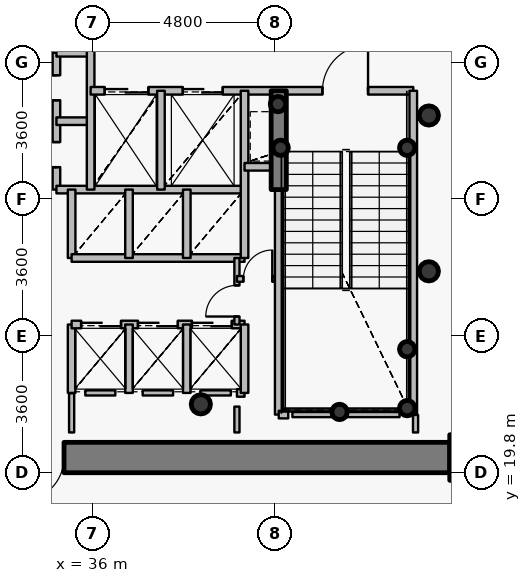
"""IFC4 building model, lengths in metres.
Left out: names, types, materials, properties, quantities, classifications, styles, units other than length and angle.
Written with IfcOpenShell. Run it as: python <this file> out.ifc"""

import sys

from ifc_helpers import new_model, si_unit, direction, frame, frame_2d, origin, origin_2d, place, context, subcontext, project, spatial, rectangle, hollow_circle, extrude, source, transform, mapped, element, fill, save


model = new_model("IFC4")
c1 = context("Model", 3, precision=1e-05, world=origin(), true_north=direction((0.0, 1.0)))
c2 = subcontext(c1, "Body", "Model", "MODEL_VIEW")
j1 = project(units=[si_unit("LENGTHUNIT", "METRE"), si_unit("PLANEANGLEUNIT", "RADIAN")], contexts=[c1])
p1 = place(None, origin())
s1 = spatial("IfcSite", under=j1, at=p1, CompositionType="ELEMENT")
p2 = place(p1, origin())
s2 = spatial("IfcBuilding", under=s1, at=p2, CompositionType="ELEMENT")
p3 = place(p2, frame((0.0, 0.0, 130.95)))
s3 = spatial("IfcBuildingStorey", under=s2, at=p3, CompositionType="ELEMENT", Elevation=130.95)
p4 = place(p3, frame((46.0, 20.2, 0.0), z_axis=(0.0, 0.0, 1.0), x_axis=(1.0, 0.0, 0.0)))
e1 = element("IfcColumn", 1, at=p4, inside=s3, PredefinedType="COLUMN", context=c2, shape_type="SweptSolid", body=[
    extrude(rectangle(XDim=1.2, YDim=1.2, at=origin_2d()), origin(), (0.0, 0.0, 1.0), 3.75),
])
p5 = place(p3, frame((38.85, 21.6, 0.0), z_axis=(0.0, 0.0, 1.0), x_axis=(1.0, 0.0, 0.0)))
e2 = element("IfcColumn", 2, at=p5, inside=s3, PredefinedType="COLUMN", context=c2, shape_type="SweptSolid", body=[
    extrude(hollow_circle(Radius=0.254, WallThickness=0.02, at=origin_2d()), origin(), (0.0, 0.0, 1.0), 3.75),
])
for number, where, z_axis, x_axis in (
    (3, (44.28, 21.5, 0.0), (0.0, 0.0, 1.0), (1.0, 0.0, 0.0)),
    (4, (44.28, 23.05, 0.0), (0.0, 0.0, 1.0), (1.0, 0.0, 0.0)),
    (5, (42.5, 21.4, 0.0), (0.0, 0.0, 1.0), (1.0, 0.0, 0.0)),
    (6, (40.95, 28.35, 0.0), (0.0, 0.0, 1.0), (1.0, 0.0, 0.0)),
    (7, (44.28, 28.35, 0.0), (0.0, 0.0, 1.0), (1.0, 0.0, 0.0)),
    (8, (40.88, 29.5, 0.0), (0.0, 0.0, 1.0), (1.0, 0.0, 0.0)),
):
    element("IfcColumn", number, at=place(p3, frame(where, z_axis=z_axis, x_axis=x_axis)), inside=s3, PredefinedType="COLUMN", context=c2, shape_type="SweptSolid", body=[
        extrude(hollow_circle(Radius=0.203, WallThickness=0.016, at=origin_2d()), origin(), (0.0, 0.0, 1.0), 3.75),
    ])
p6 = place(p3, frame((45.4, 20.2, 0.0), z_axis=(0.0, 0.0, 1.0), x_axis=(-1.0, 0.0, 0.0)))
e9 = element("IfcWall", 9, at=p6, inside=s3, PredefinedType="SHEAR", context=c2, shape_type="SweptSolid", body=[
    extrude(rectangle(XDim=18.8, YDim=0.8, at=frame_2d((9.4, 0.0))), origin(), (0.0, 0.0, 1.0), 2.95),
])
p7 = place(p6, frame((10.15, 0.0, 0.0)))
e10 = element("IfcOpeningElement", 10, at=p7, cuts=e9, PredefinedType="OPENING", context=c2, shape_type="SweptSolid", body=[
    extrude(rectangle(XDim=1.15, YDim=2.15, at=origin_2d()), frame((0.575, 0.41, 1.075), z_axis=(0.0, -1.0, 0.0), x_axis=(1.0, 0.0, 0.0)), (0.0, 0.0, 1.0), 0.82),
])
p8 = place(p3, frame((40.9, 27.25, 0.0), z_axis=(0.0, 0.0, 1.0), x_axis=(0.0, 1.0, 0.0)))
e11 = element("IfcWall", 11, at=p8, inside=s3, PredefinedType="SHEAR", context=c2, shape_type="SweptSolid", body=[
    extrude(rectangle(XDim=2.6, YDim=0.4, at=frame_2d((1.3, 0.0))), origin(), (0.0, 0.0, 1.0), 3.1),
])
for number, where, z_axis, x_axis in (
    (12, (44.85, 25.1, 0.0), (0.0, 0.0, 1.0), (1.0, 0.0, 0.0)),
    (13, (44.85, 29.2, 0.0), (0.0, 0.0, 1.0), (1.0, 0.0, 0.0)),
):
    element("IfcColumn", number, at=place(p3, frame(where, z_axis=z_axis, x_axis=x_axis)), inside=s3, PredefinedType="COLUMN", context=c2, shape_type="SweptSolid", body=[
        extrude(hollow_circle(Radius=0.254, WallThickness=0.02, at=origin_2d()), origin(), (0.0, 0.0, 1.0), 3.75),
    ])
p9 = place(p3, frame((35.05, 27.25, 0.0), z_axis=(0.0, 0.0, 1.0), x_axis=(0.0, 1.0, 0.0)))
e14 = element("IfcWall", 14, at=p9, inside=s3, PredefinedType="PARTITIONING", context=c2, shape_type="SweptSolid", body=[
    extrude(rectangle(XDim=3.6, YDim=0.2, at=frame_2d((1.8, 0.0))), origin(), (0.0, 0.0, 1.0), 3.5),
])
p10 = place(p9, frame((0.59, 0.0, 0.0)))
e15 = element("IfcOpeningElement", 15, at=p10, cuts=e14, PredefinedType="OPENING", context=c2, shape_type="SweptSolid", body=[
    extrude(rectangle(XDim=0.66, YDim=2.05, at=origin_2d()), frame((0.33, 0.11, 1.025), z_axis=(0.0, -1.0, 0.0), x_axis=(1.0, 0.0, 0.0)), (0.0, 0.0, 1.0), 0.22),
])
p11 = place(p9, frame((2.35, 0.0, 0.0)))
e16 = element("IfcOpeningElement", 16, at=p11, cuts=e14, PredefinedType="OPENING", context=c2, shape_type="SweptSolid", body=[
    extrude(rectangle(XDim=0.66, YDim=2.05, at=origin_2d()), frame((0.33, 0.11, 1.025), z_axis=(0.0, -1.0, 0.0), x_axis=(1.0, 0.0, 0.0)), (0.0, 0.0, 1.0), 0.22),
])
p12 = place(p3, frame((35.05, 27.25, 0.0), z_axis=(0.0, 0.0, 1.0), x_axis=(1.0, 0.0, 0.0)))
e17 = element("IfcWall", 17, at=p12, inside=s3, PredefinedType="PARTITIONING", context=c2, shape_type="SweptSolid", body=[
    extrude(rectangle(XDim=4.95, YDim=0.2, at=frame_2d((2.475, 0.0))), origin(), (0.0, 0.0, 1.0), 3.085),
])
for number, where, z_axis, x_axis in (
    (18, (35.05, 29.05, 0.0), (0.0, 0.0, 1.0), (1.0, 0.0, 0.0)),
    (19, (35.05, 30.85, 0.0), (0.0, 0.0, 1.0), (1.0, 0.0, 0.0)),
):
    element("IfcWall", number, at=place(p3, frame(where, z_axis=z_axis, x_axis=x_axis)), inside=s3, PredefinedType="PARTITIONING", context=c2, shape_type="SweptSolid", body=[
        extrude(rectangle(XDim=0.9, YDim=0.2, at=frame_2d((0.45, 0.0))), origin(), (0.0, 0.0, 1.0), 3.5),
    ])
p13 = place(p3, frame((35.45, 21.9, 0.0), z_axis=(0.0, 0.0, 1.0), x_axis=(0.0, 1.0, 0.0)))
e20 = element("IfcWall", 20, at=p13, inside=s3, PredefinedType="PARTITIONING", context=c2, shape_type="SweptSolid", body=[
    extrude(rectangle(XDim=1.8, YDim=0.2, at=frame_2d((0.9, 0.0))), origin(), (0.0, 0.0, 1.0), 3.5),
])
p14 = place(p3, frame((35.45, 23.7, 0.0), z_axis=(0.0, 0.0, 1.0), x_axis=(1.0, 0.0, 0.0)))
e21 = element("IfcWall", 21, at=p14, inside=s3, PredefinedType="PARTITIONING", context=c2, shape_type="SweptSolid", body=[
    extrude(rectangle(XDim=4.55, YDim=0.2, at=frame_2d((2.275, 0.0))), origin(), (0.0, 0.0, 1.0), 3.085),
])
p15 = place(p14, frame((0.25, 0.0, 0.0)))
e22 = element("IfcOpeningElement", 22, at=p15, cuts=e21, PredefinedType="OPENING", context=c2, shape_type="SweptSolid", body=[
    extrude(rectangle(XDim=1.05, YDim=2.15, at=origin_2d()), frame((0.525, 0.11, 1.075), z_axis=(0.0, -1.0, 0.0), x_axis=(1.0, 0.0, 0.0)), (0.0, 0.0, 1.0), 0.22),
])
p16 = place(p14, frame((1.745, 0.0, 0.0)))
e23 = element("IfcOpeningElement", 23, at=p16, cuts=e21, PredefinedType="OPENING", context=c2, shape_type="SweptSolid", body=[
    extrude(rectangle(XDim=1.05, YDim=2.15, at=origin_2d()), frame((0.525, 0.11, 1.075), z_axis=(0.0, -1.0, 0.0), x_axis=(1.0, 0.0, 0.0)), (0.0, 0.0, 1.0), 0.22),
])
p17 = place(p14, frame((3.165, 0.0, 0.0)))
e24 = element("IfcOpeningElement", 24, at=p17, cuts=e21, PredefinedType="OPENING", context=c2, shape_type="SweptSolid", body=[
    extrude(rectangle(XDim=1.05, YDim=2.15, at=origin_2d()), frame((0.525, 0.11, 1.075), z_axis=(0.0, -1.0, 0.0), x_axis=(1.0, 0.0, 0.0)), (0.0, 0.0, 1.0), 0.22),
])
p18 = place(p3, frame((35.45, 25.45, 0.0), z_axis=(0.0, 0.0, 1.0), x_axis=(0.0, 1.0, 0.0)))
e25 = element("IfcWall", 25, at=p18, inside=s3, PredefinedType="PARTITIONING", context=c2, shape_type="SweptSolid", body=[
    extrude(rectangle(XDim=1.8, YDim=0.2, at=frame_2d((0.9, 0.0))), origin(), (0.0, 0.0, 1.0), 3.5),
])
p19 = place(p3, frame((35.45, 25.45, 0.0), z_axis=(0.0, 0.0, 1.0), x_axis=(1.0, 0.0, 0.0)))
e26 = element("IfcWall", 26, at=p19, inside=s3, PredefinedType="PARTITIONING", context=c2, shape_type="SweptSolid", body=[
    extrude(rectangle(XDim=4.55, YDim=0.2, at=frame_2d((2.275, 0.0))), origin(), (0.0, 0.0, 1.0), 3.085),
])
p20 = place(p3, frame((35.95, 27.25, 0.0), z_axis=(0.0, 0.0, 1.0), x_axis=(0.0, 1.0, 0.0)))
e27 = element("IfcWall", 27, at=p20, inside=s3, PredefinedType="PARTITIONING", context=c2, shape_type="SweptSolid", body=[
    extrude(rectangle(XDim=3.8, YDim=0.2, at=frame_2d((1.9, 0.0))), origin(), (0.0, 0.0, 1.0), 3.5),
])
p21 = place(p3, frame((35.95, 29.85, 0.0), z_axis=(0.0, 0.0, 1.0), x_axis=(1.0, 0.0, 0.0)))
e28 = element("IfcWall", 28, at=p21, inside=s3, PredefinedType="PARTITIONING", context=c2, shape_type="SweptSolid", body=[
    extrude(rectangle(XDim=8.49, YDim=0.2, at=frame_2d((4.245, 0.0))), origin(), (0.0, 0.0, 1.0), 3.085),
])
p22 = place(p21, frame((6.1, 0.0, 0.0)))
e29 = element("IfcOpeningElement", 29, at=p22, cuts=e28, PredefinedType="OPENING", context=c2, shape_type="SweptSolid", body=[
    extrude(rectangle(XDim=1.2, YDim=2.15, at=origin_2d()), frame((0.6, 0.11, 1.075), z_axis=(0.0, -1.0, 0.0), x_axis=(1.0, 0.0, 0.0)), (0.0, 0.0, 1.0), 0.22),
])
p23 = place(p21, frame((0.37, 0.0, 0.0)))
e30 = element("IfcOpeningElement", 30, at=p23, cuts=e28, PredefinedType="OPENING", context=c2, shape_type="SweptSolid", body=[
    extrude(rectangle(XDim=1.15, YDim=2.15, at=origin_2d()), frame((0.575, 0.11, 1.075), z_axis=(0.0, -1.0, 0.0), x_axis=(1.0, 0.0, 0.0)), (0.0, 0.0, 1.0), 0.22),
])
p24 = place(p21, frame((2.425, 0.0, 0.0)))
e31 = element("IfcOpeningElement", 31, at=p24, cuts=e28, PredefinedType="OPENING", context=c2, shape_type="SweptSolid", body=[
    extrude(rectangle(XDim=1.05, YDim=2.15, at=origin_2d()), frame((0.525, 0.11, 1.075), z_axis=(0.0, -1.0, 0.0), x_axis=(1.0, 0.0, 0.0)), (0.0, 0.0, 1.0), 0.22),
])
for number, where, z_axis, x_axis in (
    (32, (36.96, 21.9, 0.0), (0.0, 0.0, 1.0), (0.0, 1.0, 0.0)),
    (33, (36.96, 25.45, 0.0), (0.0, 0.0, 1.0), (0.0, 1.0, 0.0)),
):
    element("IfcWall", number, at=place(p3, frame(where, z_axis=z_axis, x_axis=x_axis)), inside=s3, PredefinedType="PARTITIONING", context=c2, shape_type="SweptSolid", body=[
        extrude(rectangle(XDim=1.8, YDim=0.2, at=frame_2d((0.9, 0.0))), origin(), (0.0, 0.0, 1.0), 3.5),
    ])
p25 = place(p3, frame((37.8, 27.25, 0.0), z_axis=(0.0, 0.0, 1.0), x_axis=(0.0, 1.0, 0.0)))
e34 = element("IfcWall", 34, at=p25, inside=s3, PredefinedType="PARTITIONING", context=c2, shape_type="SweptSolid", body=[
    extrude(rectangle(XDim=2.6, YDim=0.2, at=frame_2d((1.3, 0.0))), origin(), (0.0, 0.0, 1.0), 3.5),
])
for number, where, z_axis, x_axis in (
    (35, (38.48, 21.9, 0.0), (0.0, 0.0, 1.0), (0.0, 1.0, 0.0)),
    (36, (38.48, 25.45, 0.0), (0.0, 0.0, 1.0), (0.0, 1.0, 0.0)),
):
    element("IfcWall", number, at=place(p3, frame(where, z_axis=z_axis, x_axis=x_axis)), inside=s3, PredefinedType="PARTITIONING", context=c2, shape_type="SweptSolid", body=[
        extrude(rectangle(XDim=1.8, YDim=0.2, at=frame_2d((0.9, 0.0))), origin(), (0.0, 0.0, 1.0), 3.5),
    ])
p26 = place(p3, frame((39.8, 21.9, 0.0), z_axis=(0.0, 0.0, 1.0), x_axis=(1.0, 0.0, 0.0)))
e37 = element("IfcWall", 37, at=p26, inside=s3, PredefinedType="PARTITIONING", context=c2, shape_type="SweptSolid", body=[
    extrude(rectangle(XDim=0.2, YDim=0.2, at=frame_2d((0.1, 0.0))), origin(), (0.0, 0.0, 1.0), 3.5),
])
p27 = place(p3, frame((39.8, 23.7, 0.0), z_axis=(0.0, 0.0, 1.0), x_axis=(0.0, 1.0, 0.0)))
e38 = element("IfcWall", 38, at=p27, inside=s3, PredefinedType="PARTITIONING", context=c2, shape_type="SweptSolid", body=[
    extrude(rectangle(XDim=1.75, YDim=0.135, at=frame_2d((0.875, 0.0))), origin(), (0.0, 0.0, 1.0), 3.5),
])
p28 = place(p27, frame((0.21, 0.0, 0.0)))
e39 = element("IfcOpeningElement", 39, at=p28, cuts=e38, PredefinedType="OPENING", context=c2, shape_type="SweptSolid", body=[
    extrude(rectangle(XDim=0.82, YDim=2.1, at=origin_2d()), frame((0.41, 0.078, 1.05), z_axis=(0.0, -1.0, 0.0), x_axis=(1.0, 0.0, 0.0)), (0.0, 0.0, 1.0), 0.155),
])
p29 = place(p3, frame((39.8, 24.9, 0.0), z_axis=(0.0, 0.0, 1.0), x_axis=(1.0, 0.0, 0.0)))
e40 = element("IfcWall", 40, at=p29, inside=s3, PredefinedType="PARTITIONING", context=c2, shape_type="SweptSolid", body=[
    extrude(rectangle(XDim=1.1, YDim=0.15, at=frame_2d((0.55, 0.0))), origin(), (0.0, 0.0, 1.0), 3.5),
])
p30 = place(p29, frame((0.17, 0.0, 0.0)))
e41 = element("IfcOpeningElement", 41, at=p30, cuts=e40, PredefinedType="OPENING", context=c2, shape_type="SweptSolid", body=[
    extrude(rectangle(XDim=0.76, YDim=2.1, at=origin_2d()), frame((0.38, 0.085, 1.05), z_axis=(0.0, -1.0, 0.0), x_axis=(1.0, 0.0, 0.0)), (0.0, 0.0, 1.0), 0.17),
])
p31 = place(p3, frame((40.0, 21.9, 0.0), z_axis=(0.0, 0.0, 1.0), x_axis=(0.0, 1.0, 0.0)))
e42 = element("IfcWall", 42, at=p31, inside=s3, PredefinedType="PARTITIONING", context=c2, shape_type="SweptSolid", body=[
    extrude(rectangle(XDim=1.8, YDim=0.2, at=frame_2d((0.9, 0.0))), origin(), (0.0, 0.0, 1.0), 3.5),
])
p32 = place(p3, frame((40.0, 25.45, 0.0), z_axis=(0.0, 0.0, 1.0), x_axis=(0.0, 1.0, 0.0)))
e43 = element("IfcWall", 43, at=p32, inside=s3, PredefinedType="PARTITIONING", context=c2, shape_type="SweptSolid", body=[
    extrude(rectangle(XDim=4.4, YDim=0.2, at=frame_2d((2.2, 0.0))), origin(), (0.0, 0.0, 1.0), 3.5),
])
p33 = place(p3, frame((40.0, 27.85, 0.0), z_axis=(0.0, 0.0, 1.0), x_axis=(1.0, 0.0, 0.0)))
e44 = element("IfcWall", 44, at=p33, inside=s3, PredefinedType="PARTITIONING", context=c2, shape_type="SweptSolid", body=[
    extrude(rectangle(XDim=0.9, YDim=0.2, at=frame_2d((0.45, 0.0))), origin(), (0.0, 0.0, 1.0), 3.5),
])
p34 = place(p3, frame((40.9, 21.33, 0.0), z_axis=(0.0, 0.0, 1.0), x_axis=(0.0, 1.0, 0.0)))
e45 = element("IfcWall", 45, at=p34, inside=s3, PredefinedType="PARTITIONING", context=c2, shape_type="SweptSolid", body=[
    extrude(rectangle(XDim=5.91, YDim=0.2, at=frame_2d((2.955, 0.0))), origin(), (0.0, 0.0, 1.0), 3.035),
])
p35 = place(p3, frame((40.9, 21.33, 0.0), z_axis=(0.0, 0.0, 1.0), x_axis=(1.0, 0.0, 0.0)))
e46 = element("IfcWall", 46, at=p35, inside=s3, PredefinedType="PARTITIONING", context=c2, shape_type="SweptSolid", body=[
    extrude(rectangle(XDim=0.25, YDim=0.2, at=frame_2d((0.125, 0.0))), origin(), (0.0, 0.0, 1.0), 3.035),
])
p36 = place(p3, frame((44.44, 21.33, 0.0), z_axis=(0.0, 0.0, 1.0), x_axis=(0.0, 1.0, 0.0)))
e47 = element("IfcWall", 47, at=p36, inside=s3, PredefinedType="PARTITIONING", context=c2, shape_type="SweptSolid", body=[
    extrude(rectangle(XDim=8.52, YDim=0.2, at=frame_2d((4.26, 0.0))), origin(), (0.0, 0.0, 1.0), 3.5),
])
p37 = place(p3, frame((44.08, 21.33, 0.0), z_axis=(0.0, 0.0, 1.0), x_axis=(-1.0, 0.0, 0.0)))
e48 = element("IfcWall", 48, at=p37, inside=s3, PredefinedType="PARTITIONING", context=c2, shape_type="SweptSolid", body=[
    extrude(rectangle(XDim=2.82, YDim=0.135, at=frame_2d((1.41, 0.0))), origin(), (0.0, 0.0, 1.0), 3.035),
])
p38 = place(p3, frame((36.6, 21.9, 0.0), z_axis=(0.0, 0.0, 1.0), x_axis=(-1.0, 0.0, 0.0)))
e49 = element("IfcWall", 49, at=p38, inside=s3, PredefinedType="PARTITIONING", context=c2, shape_type="SweptSolid", body=[
    extrude(rectangle(XDim=0.79, YDim=0.135, at=frame_2d((0.395, 0.0))), origin(), (0.0, 0.0, 1.0), 3.5),
])
p39 = place(p3, frame((38.12, 21.9, 0.0), z_axis=(0.0, 0.0, 1.0), x_axis=(-1.0, 0.0, 0.0)))
e50 = element("IfcWall", 50, at=p39, inside=s3, PredefinedType="PARTITIONING", context=c2, shape_type="SweptSolid", body=[
    extrude(rectangle(XDim=0.8, YDim=0.135, at=frame_2d((0.4, 0.0))), origin(), (0.0, 0.0, 1.0), 3.5),
])
p40 = place(p3, frame((39.64, 21.9, 0.0), z_axis=(0.0, 0.0, 1.0), x_axis=(-1.0, 0.0, 0.0)))
e51 = element("IfcWall", 51, at=p40, inside=s3, PredefinedType="PARTITIONING", context=c2, shape_type="SweptSolid", body=[
    extrude(rectangle(XDim=0.8, YDim=0.135, at=frame_2d((0.4, 0.0))), origin(), (0.0, 0.0, 1.0), 3.085),
])
p41 = place(p3, frame((39.8, 20.86, 0.0), z_axis=(0.0, 0.0, 1.0), x_axis=(0.0, 1.0, 0.0)))
e52 = element("IfcWall", 52, at=p41, inside=s3, PredefinedType="PARTITIONING", context=c2, shape_type="SweptSolid", body=[
    extrude(rectangle(XDim=0.68, YDim=0.135, at=frame_2d((0.34, 0.0))), origin(), (0.0, 0.0, 1.0), 3.035),
])
p42 = place(p3, frame((44.5, 20.86, 0.0), z_axis=(0.0, 0.0, 1.0), x_axis=(0.0, 1.0, 0.0)))
e53 = element("IfcWall", 53, at=p42, inside=s3, PredefinedType="PARTITIONING", context=c2, shape_type="SweptSolid", body=[
    extrude(rectangle(XDim=0.46, YDim=0.135, at=frame_2d((0.23, 0.0))), origin(), (0.0, 0.0, 1.0), 3.5),
])
p43 = place(p3, frame((35.45, 21.89, 0.0), z_axis=(0.0, 0.0, 1.0), x_axis=(0.0, -1.0, 0.0)))
e54 = element("IfcWall", 54, at=p43, inside=s3, PredefinedType="PARTITIONING", context=c2, shape_type="SweptSolid", body=[
    extrude(rectangle(XDim=1.03, YDim=0.135, at=frame_2d((0.515, 0.0))), origin(), (0.0, 0.0, 1.0), 3.085),
])
p44 = place(p3, frame((45.41, 19.8, 0.0), z_axis=(0.0, 0.0, 1.0), x_axis=(1.0, 0.0, 0.0)))
e55 = element("IfcWall", 55, at=p44, inside=s3, PredefinedType="PARTITIONING", context=c2, shape_type="SweptSolid", body=[
    extrude(rectangle(XDim=0.99, YDim=0.135, at=frame_2d((0.495, 0.0))), origin(), (0.0, 0.0, 1.0), 2.935),
])
m1 = source(origin(), c2, "Body", "SweptSolid", [
    extrude(rectangle(XDim=1.15, YDim=2.15, at=origin_2d()), frame((0.575, 0.025, 1.075), z_axis=(0.0, -1.0, 0.0), x_axis=(1.0, 0.0, 0.0)), (0.0, 0.0, 1.0), 0.05),
])
p45 = place(p7, origin())
e56 = element("IfcDoor", 56, at=p45, inside=s3, OperationType="SINGLE_SWING_RIGHT", PredefinedType="DOOR", context=c2, shape_type="MappedRepresentation", body=[
    mapped(m1, transform((0.0, 0.0, 0.0), x_axis=(1.0, 0.0, 0.0), y_axis=(0.0, 1.0, 0.0), z_axis=(0.0, 0.0, 1.0), scale=1.0)),
])
fill(e10, e56)
m2 = source(origin(), c2, "Body", "SweptSolid", [
    extrude(rectangle(XDim=1.2, YDim=2.15, at=origin_2d()), frame((0.6, 0.025, 1.075), z_axis=(0.0, -1.0, 0.0), x_axis=(1.0, 0.0, 0.0)), (0.0, 0.0, 1.0), 0.05),
])
p46 = place(p22, origin())
e57 = element("IfcDoor", 57, at=p46, inside=s3, OperationType="SINGLE_SWING_RIGHT", PredefinedType="DOOR", context=c2, shape_type="MappedRepresentation", body=[
    mapped(m2, transform((0.0, 0.0, 0.0), x_axis=(1.0, 0.0, 0.0), y_axis=(0.0, 1.0, 0.0), z_axis=(0.0, 0.0, 1.0), scale=1.0)),
])
fill(e29, e57)
m3 = source(origin(), c2, "Body", "SweptSolid", [
    extrude(rectangle(XDim=1.15, YDim=2.15, at=origin_2d()), frame((0.575, 0.025, 1.075), z_axis=(0.0, -1.0, 0.0), x_axis=(1.0, 0.0, 0.0)), (0.0, 0.0, 1.0), 0.05),
])
p47 = place(p23, origin())
e58 = element("IfcDoor", 58, at=p47, inside=s3, OperationType="DOUBLE_DOOR_SLIDING", PredefinedType="USERDEFINED", context=c2, shape_type="MappedRepresentation", body=[
    mapped(m3, transform((0.0, 0.0, 0.0), x_axis=(1.0, 0.0, 0.0), y_axis=(0.0, 1.0, 0.0), z_axis=(0.0, 0.0, 1.0), scale=1.0)),
])
fill(e30, e58)
m4 = source(origin(), c2, "Body", "SweptSolid", [
    extrude(rectangle(XDim=1.05, YDim=2.15, at=origin_2d()), frame((0.525, 0.025, 1.075), z_axis=(0.0, -1.0, 0.0), x_axis=(1.0, 0.0, 0.0)), (0.0, 0.0, 1.0), 0.05),
])
p48 = place(p24, origin())
e59 = element("IfcDoor", 59, at=p48, inside=s3, OperationType="DOUBLE_DOOR_SLIDING", PredefinedType="USERDEFINED", context=c2, shape_type="MappedRepresentation", body=[
    mapped(m4, transform((0.0, 0.0, 0.0), x_axis=(1.0, 0.0, 0.0), y_axis=(0.0, 1.0, 0.0), z_axis=(0.0, 0.0, 1.0), scale=1.0)),
])
fill(e31, e59)
p49 = place(p15, origin())
e60 = element("IfcDoor", 60, at=p49, inside=s3, OperationType="DOUBLE_DOOR_SLIDING", PredefinedType="USERDEFINED", context=c2, shape_type="MappedRepresentation", body=[
    mapped(m4, transform((0.0, 0.0, 0.0), x_axis=(1.0, 0.0, 0.0), y_axis=(0.0, 1.0, 0.0), z_axis=(0.0, 0.0, 1.0), scale=1.0)),
])
fill(e22, e60)
p50 = place(p16, origin())
e61 = element("IfcDoor", 61, at=p50, inside=s3, OperationType="DOUBLE_DOOR_SLIDING", PredefinedType="USERDEFINED", context=c2, shape_type="MappedRepresentation", body=[
    mapped(m4, transform((0.0, 0.0, 0.0), x_axis=(1.0, 0.0, 0.0), y_axis=(0.0, 1.0, 0.0), z_axis=(0.0, 0.0, 1.0), scale=1.0)),
])
fill(e23, e61)
p51 = place(p17, origin())
e62 = element("IfcDoor", 62, at=p51, inside=s3, OperationType="DOUBLE_DOOR_SLIDING", PredefinedType="USERDEFINED", context=c2, shape_type="MappedRepresentation", body=[
    mapped(m4, transform((0.0, 0.0, 0.0), x_axis=(1.0, 0.0, 0.0), y_axis=(0.0, 1.0, 0.0), z_axis=(0.0, 0.0, 1.0), scale=1.0)),
])
fill(e24, e62)
m5 = source(origin(), c2, "Body", "SweptSolid", [
    extrude(rectangle(XDim=0.66, YDim=2.05, at=origin_2d()), frame((0.33, 0.025, 1.025), z_axis=(0.0, -1.0, 0.0), x_axis=(1.0, 0.0, 0.0)), (0.0, 0.0, 1.0), 0.05),
])
p52 = place(p10, origin())
e63 = element("IfcDoor", 63, at=p52, inside=s3, OperationType="SINGLE_SWING_LEFT", PredefinedType="USERDEFINED", context=c2, shape_type="MappedRepresentation", body=[
    mapped(m5, transform((0.0, 0.0, 0.0), x_axis=(1.0, 0.0, 0.0), y_axis=(0.0, 1.0, 0.0), z_axis=(0.0, 0.0, 1.0), scale=1.0)),
])
fill(e15, e63)
p53 = place(p11, origin())
e64 = element("IfcDoor", 64, at=p53, inside=s3, OperationType="SINGLE_SWING_RIGHT", PredefinedType="USERDEFINED", context=c2, shape_type="MappedRepresentation", body=[
    mapped(m5, transform((0.0, 0.0, 0.0), x_axis=(1.0, 0.0, 0.0), y_axis=(0.0, 1.0, 0.0), z_axis=(0.0, 0.0, 1.0), scale=1.0)),
])
fill(e16, e64)
m6 = source(origin(), c2, "Body", "SweptSolid", [
    extrude(rectangle(XDim=0.82, YDim=2.1, at=origin_2d()), frame((0.41, 0.025, 1.05), z_axis=(0.0, -1.0, 0.0), x_axis=(1.0, 0.0, 0.0)), (0.0, 0.0, 1.0), 0.05),
])
p54 = place(p28, origin())
e65 = element("IfcDoor", 65, at=p54, inside=s3, OperationType="SINGLE_SWING_LEFT", PredefinedType="DOOR", context=c2, shape_type="MappedRepresentation", body=[
    mapped(m6, transform((0.0, 0.0, 0.0), x_axis=(1.0, 0.0, 0.0), y_axis=(0.0, 1.0, 0.0), z_axis=(0.0, 0.0, 1.0), scale=1.0)),
])
fill(e39, e65)
m7 = source(origin(), c2, "Body", "SweptSolid", [
    extrude(rectangle(XDim=0.76, YDim=2.1, at=origin_2d()), frame((0.38, 0.025, 1.05), z_axis=(0.0, -1.0, 0.0), x_axis=(1.0, 0.0, 0.0)), (0.0, 0.0, 1.0), 0.05),
])
p55 = place(p30, origin())
e66 = element("IfcDoor", 66, at=p55, inside=s3, OperationType="SINGLE_SWING_RIGHT", PredefinedType="DOOR", context=c2, shape_type="MappedRepresentation", body=[
    mapped(m7, transform((0.0, 0.0, 0.0), x_axis=(1.0, 0.0, 0.0), y_axis=(0.0, 1.0, 0.0), z_axis=(0.0, 0.0, 1.0), scale=1.0)),
])
fill(e41, e66)
save(model, sys.argv[1])
